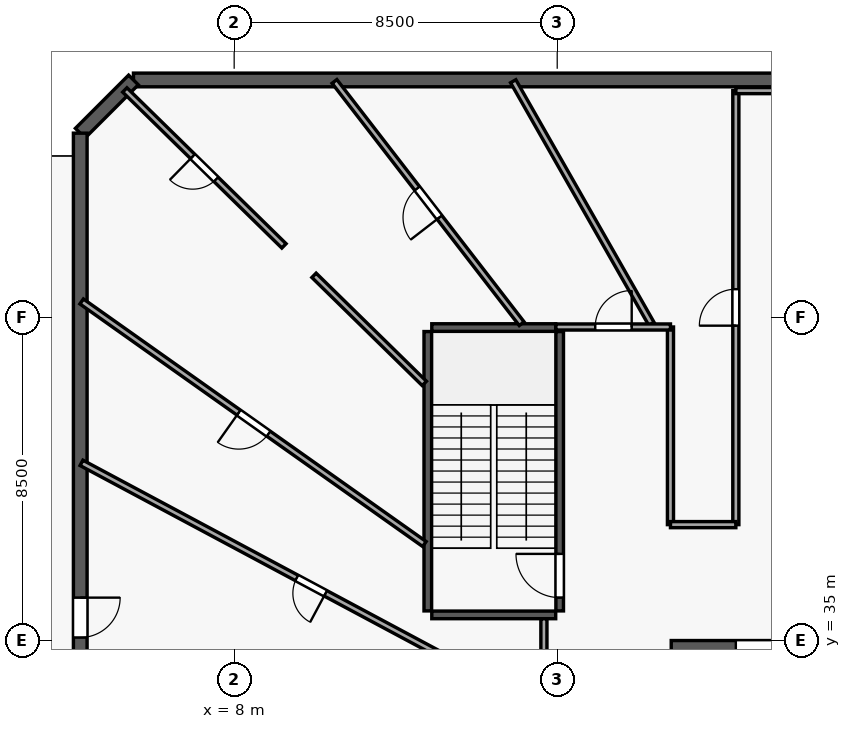
"""IFC4 building model, lengths in metres.
Left out: names, types, materials, properties, quantities, classifications, styles, units other than length and angle.
Written with IfcOpenShell. Run it as: python <this file> out.ifc"""

import sys

from ifc_helpers import new_model, si_unit, direction, frame, frame_2d, origin, origin_with_axes, origin_2d, place, context, subcontext, project, spatial, rectangle, circle, extrude, source, transform, mapped, element, fill, save


model = new_model("IFC4")
c1 = context("Model", 3, precision=1e-05, world=origin(), true_north=direction((0.0, 1.0)))
c2 = subcontext(c1, "Body", "Model", "MODEL_VIEW")
j1 = project(units=[si_unit("LENGTHUNIT", "METRE"), si_unit("PLANEANGLEUNIT", "RADIAN")], contexts=[c1])
p1 = place(None, origin())
s1 = spatial("IfcSite", under=j1, at=p1, CompositionType="ELEMENT")
p2 = place(p1, origin())
s2 = spatial("IfcBuilding", under=s1, at=p2, CompositionType="ELEMENT")
p3 = place(p2, frame((0.0, 0.0, 9.0)))
s3 = spatial("IfcBuildingStorey", under=s2, at=p3, CompositionType="ELEMENT", Elevation=9.0)
p4 = place(p3, frame((26.55, 34.7, 0.0), z_axis=(0.0, 0.0, 1.0), x_axis=(-1.0, 0.0, 0.0)))
e1 = element("IfcWall", 1, at=p4, inside=s3, PredefinedType="SHEAR", context=c2, shape_type="SweptSolid", body=[
    extrude(rectangle(XDim=7.05, YDim=0.6, at=frame_2d((3.525, 0.0))), origin(), (0.0, 0.0, 1.0), 4.2),
])
p5 = place(p4, frame((4.25, 0.0, 0.0)))
e2 = element("IfcOpeningElement", 2, at=p5, cuts=e1, PredefinedType="OPENING", context=c2, shape_type="SweptSolid", body=[
    extrude(rectangle(XDim=1.1, YDim=2.15, at=frame_2d((0.55, 1.075))), frame((0.0, 0.31, 0.0), z_axis=(0.0, -1.0, 0.0), x_axis=(1.0, 0.0, 0.0)), (0.0, 0.0, 1.0), 0.62),
])
m1 = source(origin_with_axes(), c2, "Body", "SweptSolid", [
    extrude(circle(Radius=0.9, at=origin_2d()), origin(), (0.0, 0.0, 1.0), 4.5),
])
p6 = place(p3, frame((19.5, 34.7, 0.0), z_axis=(0.0, 0.0, 1.0), x_axis=(1.0, 0.0, 0.0)))
e3 = element("IfcColumn", 3, at=p6, inside=s3, PredefinedType="COLUMN", context=c2, shape_type="MappedRepresentation", body=[
    mapped(m1, transform((0.0, 0.0, 0.0), scale=1.0)),
])
m2 = source(origin_with_axes(), c2, "Body", "SweptSolid", [
    extrude(circle(Radius=0.8, at=origin_2d()), origin(), (0.0, 0.0, 1.0), 4.5),
])
p7 = place(p3, frame((10.2, 45.5, 0.0), z_axis=(0.0, 0.0, 1.0), x_axis=(1.0, 0.0, 0.0)))
e4 = element("IfcColumn", 4, at=p7, inside=s3, PredefinedType="COLUMN", context=c2, shape_type="MappedRepresentation", body=[
    mapped(m2, transform((0.0, 0.0, 0.0), scale=1.0)),
])
p8 = place(p3, frame((54.6, 49.75, 0.0), z_axis=(0.0, 0.0, 1.0), x_axis=(-1.0, 0.0, 0.0)))
e5 = element("IfcWall", 5, at=p8, inside=s3, PredefinedType="SOLIDWALL", context=c2, shape_type="SweptSolid", body=[
    extrude(rectangle(XDim=49.25, YDim=0.36, at=frame_2d((24.625, 0.0))), origin(), (0.0, 0.0, 1.0), 4.2),
])
p9 = place(p8, frame((1.866, 0.0, 0.85)))
e6 = element("IfcOpeningElement", 6, at=p9, cuts=e5, PredefinedType="OPENING", context=c2, shape_type="SweptSolid", body=[
    extrude(rectangle(XDim=1.8, YDim=2.2, at=frame_2d((0.9, 1.1))), frame((0.0, 0.19, 0.0), z_axis=(0.0, -1.0, 0.0), x_axis=(1.0, 0.0, 0.0)), (0.0, 0.0, 1.0), 0.38),
])
p10 = place(p8, frame((6.763, 0.0, 0.85)))
e7 = element("IfcOpeningElement", 7, at=p10, cuts=e5, PredefinedType="OPENING", context=c2, shape_type="SweptSolid", body=[
    extrude(rectangle(XDim=1.8, YDim=2.2, at=frame_2d((0.9, 1.1))), frame((0.0, 0.19, 0.0), z_axis=(0.0, -1.0, 0.0), x_axis=(1.0, 0.0, 0.0)), (0.0, 0.0, 1.0), 0.38),
])
p11 = place(p8, frame((11.474, 0.0, 0.85)))
e8 = element("IfcOpeningElement", 8, at=p11, cuts=e5, PredefinedType="OPENING", context=c2, shape_type="SweptSolid", body=[
    extrude(rectangle(XDim=1.8, YDim=2.2, at=frame_2d((0.9, 1.1))), frame((0.0, 0.19, 0.0), z_axis=(0.0, -1.0, 0.0), x_axis=(1.0, 0.0, 0.0)), (0.0, 0.0, 1.0), 0.38),
])
p12 = place(p8, frame((16.083, 0.0, 0.85)))
e9 = element("IfcOpeningElement", 9, at=p12, cuts=e5, PredefinedType="OPENING", context=c2, shape_type="SweptSolid", body=[
    extrude(rectangle(XDim=1.8, YDim=2.2, at=frame_2d((0.9, 1.1))), frame((0.0, 0.19, 0.0), z_axis=(0.0, -1.0, 0.0), x_axis=(1.0, 0.0, 0.0)), (0.0, 0.0, 1.0), 0.38),
])
p13 = place(p8, frame((20.595, 0.0, 0.85)))
e10 = element("IfcOpeningElement", 10, at=p13, cuts=e5, PredefinedType="OPENING", context=c2, shape_type="SweptSolid", body=[
    extrude(rectangle(XDim=1.8, YDim=2.2, at=frame_2d((0.9, 1.1))), frame((0.0, 0.19, 0.0), z_axis=(0.0, -1.0, 0.0), x_axis=(1.0, 0.0, 0.0)), (0.0, 0.0, 1.0), 0.38),
])
p14 = place(p8, frame((24.23, 0.0, 0.85)))
e11 = element("IfcOpeningElement", 11, at=p14, cuts=e5, PredefinedType="OPENING", context=c2, shape_type="SweptSolid", body=[
    extrude(rectangle(XDim=1.8, YDim=2.2, at=frame_2d((0.9, 1.1))), frame((0.0, 0.19, 0.0), z_axis=(0.0, -1.0, 0.0), x_axis=(1.0, 0.0, 0.0)), (0.0, 0.0, 1.0), 0.38),
])
p15 = place(p8, frame((30.4, 0.0, 0.85)))
e12 = element("IfcOpeningElement", 12, at=p15, cuts=e5, PredefinedType="OPENING", context=c2, shape_type="SweptSolid", body=[
    extrude(rectangle(XDim=1.8, YDim=2.2, at=frame_2d((0.9, 1.1))), frame((0.0, 0.19, 0.0), z_axis=(0.0, -1.0, 0.0), x_axis=(1.0, 0.0, 0.0)), (0.0, 0.0, 1.0), 0.38),
])
p16 = place(p8, frame((35.42, 0.0, 0.85)))
e13 = element("IfcOpeningElement", 13, at=p16, cuts=e5, PredefinedType="OPENING", context=c2, shape_type="SweptSolid", body=[
    extrude(rectangle(XDim=1.8, YDim=2.2, at=frame_2d((0.9, 1.1))), frame((0.0, 0.19, 0.0), z_axis=(0.0, -1.0, 0.0), x_axis=(1.0, 0.0, 0.0)), (0.0, 0.0, 1.0), 0.38),
])
p17 = place(p8, frame((40.69, 0.0, 0.85)))
e14 = element("IfcOpeningElement", 14, at=p17, cuts=e5, PredefinedType="OPENING", context=c2, shape_type="SweptSolid", body=[
    extrude(rectangle(XDim=1.8, YDim=2.2, at=frame_2d((0.9, 1.1))), frame((0.0, 0.19, 0.0), z_axis=(0.0, -1.0, 0.0), x_axis=(1.0, 0.0, 0.0)), (0.0, 0.0, 1.0), 0.38),
])
p18 = place(p8, frame((45.58, 0.0, 0.85)))
e15 = element("IfcOpeningElement", 15, at=p18, cuts=e5, PredefinedType="OPENING", context=c2, shape_type="SweptSolid", body=[
    extrude(rectangle(XDim=1.8, YDim=2.2, at=frame_2d((0.9, 1.1))), frame((0.0, 0.19, 0.0), z_axis=(0.0, -1.0, 0.0), x_axis=(1.0, 0.0, 0.0)), (0.0, 0.0, 1.0), 0.38),
])
p19 = place(p3, frame((5.35, 49.75, 0.0), z_axis=(0.0, 0.0, 1.0), x_axis=(-0.707168432242, -0.707045124756, 0.0)))
e16 = element("IfcWall", 16, at=p19, inside=s3, PredefinedType="SOLIDWALL", context=c2, shape_type="SweptSolid", body=[
    extrude(rectangle(XDim=1.98, YDim=0.36, at=frame_2d((0.99, 0.0))), origin(), (0.0, 0.0, 1.0), 4.2),
])
p20 = place(p3, frame((3.95, 48.35, 0.0), z_axis=(0.0, 0.0, 1.0), x_axis=(0.0, -1.0, 0.0)))
e17 = element("IfcWall", 17, at=p20, inside=s3, PredefinedType="SOLIDWALL", context=c2, shape_type="SweptSolid", body=[
    extrude(rectangle(XDim=43.7, YDim=0.36, at=frame_2d((21.85, 0.0))), origin(), (0.0, 0.0, 1.0), 4.2),
])
p21 = place(p20, frame((1.439, 0.0, 0.85)))
e18 = element("IfcOpeningElement", 18, at=p21, cuts=e17, PredefinedType="OPENING", context=c2, shape_type="SweptSolid", body=[
    extrude(rectangle(XDim=1.8, YDim=2.2, at=frame_2d((0.9, 1.1))), frame((0.0, 0.19, 0.0), z_axis=(0.0, -1.0, 0.0), x_axis=(1.0, 0.0, 0.0)), (0.0, 0.0, 1.0), 0.38),
])
p22 = place(p20, frame((5.669, 0.0, 0.85)))
e19 = element("IfcOpeningElement", 19, at=p22, cuts=e17, PredefinedType="OPENING", context=c2, shape_type="SweptSolid", body=[
    extrude(rectangle(XDim=1.8, YDim=2.2, at=frame_2d((0.9, 1.1))), frame((0.0, 0.19, 0.0), z_axis=(0.0, -1.0, 0.0), x_axis=(1.0, 0.0, 0.0)), (0.0, 0.0, 1.0), 0.38),
])
p23 = place(p20, frame((15.485, 0.0, 0.85)))
e20 = element("IfcOpeningElement", 20, at=p23, cuts=e17, PredefinedType="OPENING", context=c2, shape_type="SweptSolid", body=[
    extrude(rectangle(XDim=1.8, YDim=2.2, at=frame_2d((0.9, 1.1))), frame((0.0, 0.19, 0.0), z_axis=(0.0, -1.0, 0.0), x_axis=(1.0, 0.0, 0.0)), (0.0, 0.0, 1.0), 0.38),
])
p24 = place(p20, frame((20.96, 0.0, 0.85)))
e21 = element("IfcOpeningElement", 21, at=p24, cuts=e17, PredefinedType="OPENING", context=c2, shape_type="SweptSolid", body=[
    extrude(rectangle(XDim=1.8, YDim=2.2, at=frame_2d((0.9, 1.1))), frame((0.0, 0.19, 0.0), z_axis=(0.0, -1.0, 0.0), x_axis=(1.0, 0.0, 0.0)), (0.0, 0.0, 1.0), 0.38),
])
p25 = place(p20, frame((28.012, 0.0, 0.85)))
e22 = element("IfcOpeningElement", 22, at=p25, cuts=e17, PredefinedType="OPENING", context=c2, shape_type="SweptSolid", body=[
    extrude(rectangle(XDim=1.8, YDim=2.2, at=frame_2d((0.9, 1.1))), frame((0.0, 0.19, 0.0), z_axis=(0.0, -1.0, 0.0), x_axis=(1.0, 0.0, 0.0)), (0.0, 0.0, 1.0), 0.38),
])
p26 = place(p20, frame((32.279, 0.0, 0.85)))
e23 = element("IfcOpeningElement", 23, at=p26, cuts=e17, PredefinedType="OPENING", context=c2, shape_type="SweptSolid", body=[
    extrude(rectangle(XDim=1.8, YDim=2.2, at=frame_2d((0.9, 1.1))), frame((0.0, 0.19, 0.0), z_axis=(0.0, -1.0, 0.0), x_axis=(1.0, 0.0, 0.0)), (0.0, 0.0, 1.0), 0.38),
])
p27 = place(p20, frame((37.578, 0.0, 0.85)))
e24 = element("IfcOpeningElement", 24, at=p27, cuts=e17, PredefinedType="OPENING", context=c2, shape_type="SweptSolid", body=[
    extrude(rectangle(XDim=1.8, YDim=2.2, at=frame_2d((0.9, 1.1))), frame((0.0, 0.19, 0.0), z_axis=(0.0, -1.0, 0.0), x_axis=(1.0, 0.0, 0.0)), (0.0, 0.0, 1.0), 0.38),
])
p28 = place(p20, frame((12.221, 0.0, 0.0)))
e25 = element("IfcOpeningElement", 25, at=p28, cuts=e17, PredefinedType="OPENING", context=c2, shape_type="SweptSolid", body=[
    extrude(rectangle(XDim=1.05, YDim=2.12, at=frame_2d((0.525, 1.06))), frame((0.0, 0.19, 0.0), z_axis=(0.0, -1.0, 0.0), x_axis=(1.0, 0.0, 0.0)), (0.0, 0.0, 1.0), 0.38),
])
p29 = place(p3, frame((13.095, 35.78, 0.0), z_axis=(0.0, 0.0, 1.0), x_axis=(0.0, 1.0, 0.0)))
e26 = element("IfcWall", 26, at=p29, inside=s3, PredefinedType="SHEAR", context=c2, shape_type="SweptSolid", body=[
    extrude(rectangle(XDim=7.35, YDim=0.2, at=frame_2d((3.675, 0.0))), origin(), (0.0, 0.0, 1.0), 4.2),
])
p30 = place(p3, frame((16.565, 35.78, 0.0), z_axis=(0.0, 0.0, 1.0), x_axis=(0.0, 1.0, 0.0)))
e27 = element("IfcWall", 27, at=p30, inside=s3, PredefinedType="SHEAR", context=c2, shape_type="SweptSolid", body=[
    extrude(rectangle(XDim=7.35, YDim=0.2, at=frame_2d((3.675, 0.0))), origin(), (0.0, 0.0, 1.0), 4.2),
])
p31 = place(p30, frame((0.35, 0.0, 0.0)))
e28 = element("IfcOpeningElement", 28, at=p31, cuts=e27, PredefinedType="OPENING", context=c2, shape_type="SweptSolid", body=[
    extrude(rectangle(XDim=1.15, YDim=2.15, at=frame_2d((0.575, 1.075))), frame((0.0, 0.11, 0.0), z_axis=(0.0, -1.0, 0.0), x_axis=(1.0, 0.0, 0.0)), (0.0, 0.0, 1.0), 0.22),
])
for number, where, z_axis, x_axis in (
    (29, (13.2, 35.675, 0.0), (0.0, 0.0, 1.0), (1.0, 0.0, 0.0)),
    (30, (13.2, 43.235, 0.0), (0.0, 0.0, 1.0), (1.0, 0.0, 0.0)),
):
    element("IfcWall", number, at=place(p3, frame(where, z_axis=z_axis, x_axis=x_axis)), inside=s3, PredefinedType="SHEAR", context=c2, shape_type="SweptSolid", body=[
        extrude(rectangle(XDim=3.26, YDim=0.2, at=frame_2d((1.63, 0.0))), origin(), (0.0, 0.0, 1.0), 4.2),
    ])
p32 = place(p3, frame((16.068, 33.214, 0.0), z_axis=(0.0, 0.0, 1.0), x_axis=(-0.881886972295, 0.471460887132, 0.0)))
e31 = element("IfcWall", 31, at=p32, inside=s3, PredefinedType="PARTITIONING", context=c2, shape_type="SweptSolid", body=[
    extrude(rectangle(XDim=13.704, YDim=0.16, at=frame_2d((6.852, 0.0))), origin(), (0.0, 0.0, 1.0), 4.2),
])
p33 = place(p32, frame((6.422, 0.0, 0.0)))
e32 = element("IfcOpeningElement", 32, at=p33, cuts=e31, PredefinedType="OPENING", context=c2, shape_type="SweptSolid", body=[
    extrude(rectangle(XDim=0.86, YDim=2.04, at=frame_2d((0.43, 1.02))), frame((0.0, 0.09, 0.0), z_axis=(0.0, -1.0, 0.0), x_axis=(1.0, 0.0, 0.0)), (0.0, 0.0, 1.0), 0.18),
])
p34 = place(p3, frame((21.2, 38.05, 0.0), z_axis=(0.0, 0.0, 1.0), x_axis=(0.0, 1.0, 0.0)))
e33 = element("IfcWall", 33, at=p34, inside=s3, PredefinedType="PARTITIONING", context=c2, shape_type="SweptSolid", body=[
    extrude(rectangle(XDim=11.42, YDim=0.16, at=frame_2d((5.71, 0.0))), origin(), (0.0, 0.0, 1.0), 4.2),
])
p35 = place(p34, frame((5.235, 0.0, 0.0)))
e34 = element("IfcOpeningElement", 34, at=p35, cuts=e33, PredefinedType="OPENING", context=c2, shape_type="SweptSolid", body=[
    extrude(rectangle(XDim=0.96, YDim=2.15, at=frame_2d((0.48, 1.075))), frame((0.0, 0.09, 0.0), z_axis=(0.0, -1.0, 0.0), x_axis=(1.0, 0.0, 0.0)), (0.0, 0.0, 1.0), 0.18),
])
p36 = place(p3, frame((13.005, 37.54, 0.0), z_axis=(0.0, 0.0, 1.0), x_axis=(-0.816255020813, 0.577691735269, 0.0)))
e35 = element("IfcWall", 35, at=p36, inside=s3, PredefinedType="PARTITIONING", context=c2, shape_type="SweptSolid", body=[
    extrude(rectangle(XDim=11.048, YDim=0.16, at=frame_2d((5.524, 0.0))), origin(), (0.0, 0.0, 1.0), 4.2),
])
p37 = place(p36, frame((5.024, 0.0, 0.0)))
e36 = element("IfcOpeningElement", 36, at=p37, cuts=e35, PredefinedType="OPENING", context=c2, shape_type="SweptSolid", body=[
    extrude(rectangle(XDim=0.96, YDim=2.15, at=frame_2d((0.48, 1.075))), frame((0.0, 0.09, 0.0), z_axis=(0.0, -1.0, 0.0), x_axis=(1.0, 0.0, 0.0)), (0.0, 0.0, 1.0), 0.18),
])
p38 = place(p3, frame((15.565, 43.337, 0.0), z_axis=(0.0, 0.0, 1.0), x_axis=(-0.611449226112, 0.791283668407, 0.0)))
e37 = element("IfcWall", 37, at=p38, inside=s3, PredefinedType="PARTITIONING", context=c2, shape_type="SweptSolid", body=[
    extrude(rectangle(XDim=8.056, YDim=0.16, at=frame_2d((4.028, 0.0))), origin(), (0.0, 0.0, 1.0), 4.2),
])
p39 = place(p38, frame((3.535, 0.0, 0.0)))
e38 = element("IfcOpeningElement", 38, at=p39, cuts=e37, PredefinedType="OPENING", context=c2, shape_type="SweptSolid", body=[
    extrude(rectangle(XDim=0.96, YDim=2.15, at=frame_2d((0.48, 1.075))), frame((0.0, 0.09, 0.0), z_axis=(0.0, -1.0, 0.0), x_axis=(1.0, 0.0, 0.0)), (0.0, 0.0, 1.0), 0.18),
])
p40 = place(p3, frame((18.979, 43.332, 0.0), z_axis=(0.0, 0.0, 1.0), x_axis=(-0.495000650274, 0.868892603391, 0.0)))
e39 = element("IfcWall", 39, at=p40, inside=s3, PredefinedType="PARTITIONING", context=c2, shape_type="SweptSolid", body=[
    extrude(rectangle(XDim=7.348, YDim=0.16, at=frame_2d((3.674, 0.0))), origin(), (0.0, 0.0, 1.0), 4.2),
])
p41 = place(p3, frame((9.31, 45.385, 0.0), z_axis=(0.0, 0.0, 1.0), x_axis=(-0.714336488375, 0.699802387375, 0.0)))
e40 = element("IfcWall", 40, at=p41, inside=s3, PredefinedType="PARTITIONING", context=c2, shape_type="SweptSolid", body=[
    extrude(rectangle(XDim=5.862, YDim=0.16, at=frame_2d((2.931, 0.0))), origin(), (0.0, 0.0, 1.0), 4.2),
])
p42 = place(p41, frame((2.501, 0.0, 0.0)))
e41 = element("IfcOpeningElement", 41, at=p42, cuts=e40, PredefinedType="OPENING", context=c2, shape_type="SweptSolid", body=[
    extrude(rectangle(XDim=0.86, YDim=2.04, at=frame_2d((0.43, 1.02))), frame((0.0, 0.09, 0.0), z_axis=(0.0, -1.0, 0.0), x_axis=(1.0, 0.0, 0.0)), (0.0, 0.0, 1.0), 0.18),
])
p43 = place(p3, frame((16.15, 29.712, 0.0), z_axis=(0.0, 0.0, 1.0), x_axis=(0.0, 1.0, 0.0)))
e42 = element("IfcWall", 42, at=p43, inside=s3, PredefinedType="PARTITIONING", context=c2, shape_type="SweptSolid", body=[
    extrude(rectangle(XDim=5.861, YDim=0.16, at=frame_2d((2.93, 0.0))), origin(), (0.0, 0.0, 1.0), 4.2),
])
p44 = place(p43, frame((2.33, 0.0, 0.0)))
e43 = element("IfcOpeningElement", 43, at=p44, cuts=e42, PredefinedType="OPENING", context=c2, shape_type="SweptSolid", body=[
    extrude(rectangle(XDim=0.96, YDim=2.15, at=frame_2d((0.48, 1.075))), frame((0.0, 0.09, 0.0), z_axis=(0.0, -1.0, 0.0), x_axis=(1.0, 0.0, 0.0)), (0.0, 0.0, 1.0), 0.18),
])
p45 = place(p43, frame((1.2, 0.0, 0.0)))
e44 = element("IfcOpeningElement", 44, at=p45, cuts=e42, PredefinedType="OPENING", context=c2, shape_type="SweptSolid", body=[
    extrude(rectangle(XDim=0.96, YDim=2.15, at=frame_2d((0.48, 1.075))), frame((0.0, 0.09, 0.0), z_axis=(0.0, -1.0, 0.0), x_axis=(1.0, 0.0, 0.0)), (0.0, 0.0, 1.0), 0.18),
])
p46 = place(p3, frame((19.48, 43.25, 0.0), z_axis=(0.0, 0.0, 1.0), x_axis=(0.0, -1.0, 0.0)))
e45 = element("IfcWall", 45, at=p46, inside=s3, PredefinedType="PARTITIONING", context=c2, shape_type="SweptSolid", body=[
    extrude(rectangle(XDim=5.2, YDim=0.16, at=frame_2d((2.6, 0.0))), origin(), (0.0, 0.0, 1.0), 4.2),
])
p47 = place(p3, frame((21.2, 49.47, 0.0), z_axis=(0.0, 0.0, 1.0), x_axis=(1.0, 0.0, 0.0)))
e46 = element("IfcWall", 46, at=p47, inside=s3, PredefinedType="PARTITIONING", context=c2, shape_type="SweptSolid", body=[
    extrude(rectangle(XDim=4.2, YDim=0.16, at=frame_2d((2.1, 0.0))), origin(), (0.0, 0.0, 1.0), 4.2),
])
p48 = place(p3, frame((13.004, 41.766, 0.0), z_axis=(0.0, 0.0, 1.0), x_axis=(-0.714278297669, 0.699861781696, 0.0)))
e47 = element("IfcWall", 47, at=p48, inside=s3, PredefinedType="PARTITIONING", context=c2, shape_type="SweptSolid", body=[
    extrude(rectangle(XDim=4.064, YDim=0.16, at=frame_2d((2.032, 0.0))), origin(), (0.0, 0.0, 1.0), 4.2),
])
p49 = place(p3, frame((16.465, 43.25, 0.0), z_axis=(0.0, 0.0, 1.0), x_axis=(1.0, 0.0, 0.0)))
e48 = element("IfcWall", 48, at=p49, inside=s3, PredefinedType="PARTITIONING", context=c2, shape_type="SweptSolid", body=[
    extrude(rectangle(XDim=3.015, YDim=0.16, at=frame_2d((1.507, 0.0))), origin(), (0.0, 0.0, 1.0), 4.2),
])
p50 = place(p49, frame((1.035, 0.0, 0.0)))
e49 = element("IfcOpeningElement", 49, at=p50, cuts=e48, PredefinedType="OPENING", context=c2, shape_type="SweptSolid", body=[
    extrude(rectangle(XDim=0.96, YDim=2.15, at=frame_2d((0.48, 1.075))), frame((0.0, 0.09, 0.0), z_axis=(0.0, -1.0, 0.0), x_axis=(1.0, 0.0, 0.0)), (0.0, 0.0, 1.0), 0.18),
])
p51 = place(p3, frame((19.48, 38.05, 0.0), z_axis=(0.0, 0.0, 1.0), x_axis=(1.0, 0.0, 0.0)))
e50 = element("IfcWall", 50, at=p51, inside=s3, PredefinedType="PARTITIONING", context=c2, shape_type="SweptSolid", body=[
    extrude(rectangle(XDim=1.72, YDim=0.16, at=frame_2d((0.86, 0.0))), origin(), (0.0, 0.0, 1.0), 4.2),
])
m3 = source(origin_with_axes(), c2, "Body", "SweptSolid", [
    extrude(rectangle(XDim=1.8, YDim=2.2, at=frame_2d((0.9, 1.1))), frame((0.0, 0.03, 0.0), z_axis=(0.0, -1.0, 0.0), x_axis=(1.0, 0.0, 0.0)), (0.0, 0.0, 1.0), 0.06),
])
p52 = place(p16, origin())
e51 = element("IfcWindow", 51, at=p52, inside=s3, PartitioningType="SINGLE_PANEL", PredefinedType="WINDOW", context=c2, shape_type="MappedRepresentation", body=[
    mapped(m3, transform((0.0, 0.0, 0.0), scale=1.0)),
])
fill(e13, e51)
p53 = place(p17, origin())
e52 = element("IfcWindow", 52, at=p53, inside=s3, PartitioningType="SINGLE_PANEL", PredefinedType="WINDOW", context=c2, shape_type="MappedRepresentation", body=[
    mapped(m3, transform((0.0, 0.0, 0.0), scale=1.0)),
])
fill(e14, e52)
p54 = place(p18, origin())
e53 = element("IfcWindow", 53, at=p54, inside=s3, PartitioningType="SINGLE_PANEL", PredefinedType="WINDOW", context=c2, shape_type="MappedRepresentation", body=[
    mapped(m3, transform((0.0, 0.0, 0.0), scale=1.0)),
])
fill(e15, e53)
p55 = place(p21, origin())
e54 = element("IfcWindow", 54, at=p55, inside=s3, PartitioningType="SINGLE_PANEL", PredefinedType="WINDOW", context=c2, shape_type="MappedRepresentation", body=[
    mapped(m3, transform((0.0, 0.0, 0.0), scale=1.0)),
])
fill(e18, e54)
p56 = place(p22, origin())
e55 = element("IfcWindow", 55, at=p56, inside=s3, PartitioningType="SINGLE_PANEL", PredefinedType="WINDOW", context=c2, shape_type="MappedRepresentation", body=[
    mapped(m3, transform((0.0, 0.0, 0.0), scale=1.0)),
])
fill(e19, e55)
m4 = source(origin_with_axes(), c2, "Body", "SweptSolid", [
    extrude(rectangle(XDim=1.05, YDim=2.12, at=frame_2d((0.525, 1.06))), frame((0.0, 0.025, 0.0), z_axis=(0.0, -1.0, 0.0), x_axis=(1.0, 0.0, 0.0)), (0.0, 0.0, 1.0), 0.05),
])
p57 = place(p28, origin())
e56 = element("IfcDoor", 56, at=p57, inside=s3, OperationType="SINGLE_SWING_LEFT", PredefinedType="DOOR", context=c2, shape_type="MappedRepresentation", body=[
    mapped(m4, transform((0.0, 0.0, 0.0), scale=1.0)),
])
fill(e25, e56)
m5 = source(origin_with_axes(), c2, "Body", "SweptSolid", [
    extrude(rectangle(XDim=1.15, YDim=2.15, at=frame_2d((0.575, 1.075))), frame((0.0, 0.025, 0.0), z_axis=(0.0, -1.0, 0.0), x_axis=(1.0, 0.0, 0.0)), (0.0, 0.0, 1.0), 0.05),
])
p58 = place(p31, origin())
e57 = element("IfcDoor", 57, at=p58, inside=s3, OperationType="SINGLE_SWING_RIGHT", PredefinedType="DOOR", context=c2, shape_type="MappedRepresentation", body=[
    mapped(m5, transform((0.0, 0.0, 0.0), scale=1.0)),
])
fill(e28, e57)
m6 = source(origin_with_axes(), c2, "Body", "SweptSolid", [
    extrude(rectangle(XDim=0.96, YDim=2.15, at=frame_2d((0.48, 1.075))), frame((0.0, 0.025, 0.0), z_axis=(0.0, -1.0, 0.0), x_axis=(1.0, 0.0, 0.0)), (0.0, 0.0, 1.0), 0.05),
])
p59 = place(p35, origin())
e58 = element("IfcDoor", 58, at=p59, inside=s3, OperationType="SINGLE_SWING_LEFT", PredefinedType="DOOR", context=c2, shape_type="MappedRepresentation", body=[
    mapped(m6, transform((0.0, 0.0, 0.0), scale=1.0)),
])
fill(e34, e58)
p60 = place(p50, origin())
e59 = element("IfcDoor", 59, at=p60, inside=s3, OperationType="SINGLE_SWING_RIGHT", PredefinedType="DOOR", context=c2, shape_type="MappedRepresentation", body=[
    mapped(m6, transform((0.0, 0.0, 0.0), scale=1.0)),
])
fill(e49, e59)
p61 = place(p39, origin())
e60 = element("IfcDoor", 60, at=p61, inside=s3, OperationType="SINGLE_SWING_LEFT", PredefinedType="DOOR", context=c2, shape_type="MappedRepresentation", body=[
    mapped(m6, transform((0.0, 0.0, 0.0), scale=1.0)),
])
fill(e38, e60)
p62 = place(p37, origin())
e61 = element("IfcDoor", 61, at=p62, inside=s3, OperationType="SINGLE_SWING_RIGHT", PredefinedType="DOOR", context=c2, shape_type="MappedRepresentation", body=[
    mapped(m6, transform((0.0, 0.0, 0.0), scale=1.0)),
])
fill(e36, e61)
m7 = source(origin_with_axes(), c2, "Body", "SweptSolid", [
    extrude(rectangle(XDim=0.86, YDim=2.04, at=frame_2d((0.43, 1.02))), frame((0.0, 0.025, 0.0), z_axis=(0.0, -1.0, 0.0), x_axis=(1.0, 0.0, 0.0)), (0.0, 0.0, 1.0), 0.05),
])
p63 = place(p42, origin())
e62 = element("IfcDoor", 62, at=p63, inside=s3, OperationType="SINGLE_SWING_RIGHT", PredefinedType="DOOR", context=c2, shape_type="MappedRepresentation", body=[
    mapped(m7, transform((0.0, 0.0, 0.0), scale=1.0)),
])
fill(e41, e62)
p64 = place(p33, origin())
e63 = element("IfcDoor", 63, at=p64, inside=s3, OperationType="SINGLE_SWING_LEFT", PredefinedType="DOOR", context=c2, shape_type="MappedRepresentation", body=[
    mapped(m7, transform((0.0, 0.0, 0.0), scale=1.0)),
])
fill(e32, e63)
save(model, sys.argv[1])
